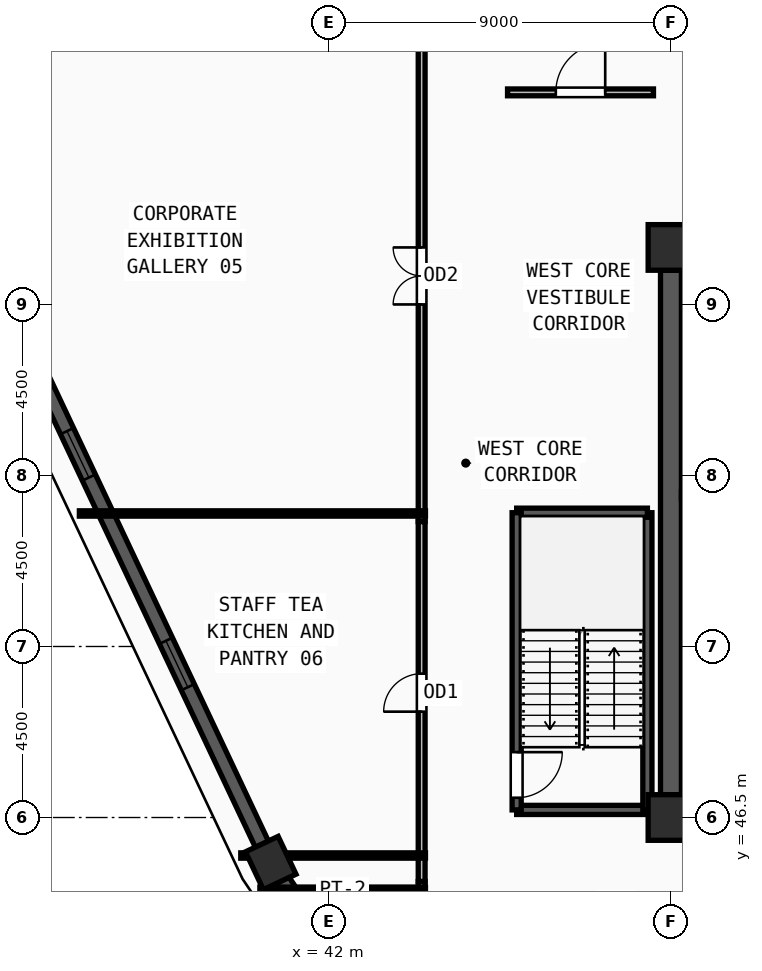
"""IFC4 building model, lengths in metres.
Left out: names, types, materials, properties, quantities, classifications, styles, units other than length and angle.
Written with IfcOpenShell. Run it as: python <this file> out.ifc"""

import sys

from ifc_helpers import new_model, si_unit, direction, frame, frame_2d, origin, origin_2d, place, context, subcontext, project, spatial, rectangle, extrude, source, transform, mapped, element, fill, save


model = new_model("IFC4")
c1 = context("Model", 3, precision=1e-05, world=origin(), true_north=direction((0.0, 1.0)))
c2 = subcontext(c1, "Body", "Model", "MODEL_VIEW")
j1 = project(units=[si_unit("LENGTHUNIT", "METRE"), si_unit("PLANEANGLEUNIT", "RADIAN")], contexts=[c1])
p1 = place(None, origin())
s1 = spatial("IfcSite", under=j1, at=p1, CompositionType="ELEMENT")
p2 = place(p1, origin())
s2 = spatial("IfcBuilding", under=s1, at=p2, CompositionType="ELEMENT")
p3 = place(p2, frame((0.0, 0.0, 339.75)))
s3 = spatial("IfcBuildingStorey", under=s2, at=p3, CompositionType="ELEMENT", Elevation=339.75)
m1 = source(origin(), c2, "Body", "SweptSolid", [
    extrude(rectangle(XDim=1.2, YDim=1.2, at=origin_2d()), origin(), (0.0, 0.0, 1.0), 3.75),
])
for number, where, z_axis, x_axis in (
    (1, (51.0, 46.5, 0.0), (0.0, 0.0, 1.0), (1.0, 0.0, 0.0)),
    (2, (51.0, 61.5, 0.0), (0.0, 0.0, 1.0), (1.0, 0.0, 0.0)),
):
    element("IfcColumn", number, at=place(p3, frame(where, z_axis=z_axis, x_axis=x_axis)), inside=s3, PredefinedType="COLUMN", context=c2, shape_type="MappedRepresentation", body=[
        mapped(m1, transform((0.0, 0.0, 0.0), x_axis=(1.0, 0.0, 0.0), y_axis=(0.0, 1.0, 0.0), z_axis=(0.0, 0.0, 1.0), scale=1.0)),
    ])
m2 = source(origin(), c2, "Body", "SweptSolid", [
    extrude(rectangle(XDim=1.1, YDim=0.95, at=origin_2d()), origin(), (0.0, 0.0, 1.0), 3.75),
])
p4 = place(p3, frame((40.469, 45.303, 0.0), z_axis=(0.0, 0.0, 1.0), x_axis=(-0.426726590606, 0.904380681389, 0.0)))
e3 = element("IfcColumn", 3, at=p4, inside=s3, PredefinedType="COLUMN", context=c2, shape_type="MappedRepresentation", body=[
    mapped(m2, transform((0.0, 0.0, 0.0), x_axis=(1.0, 0.0, 0.0), y_axis=(0.0, 1.0, 0.0), z_axis=(0.0, 0.0, 1.0), scale=1.0)),
])
p5 = place(p3, frame((31.278, 64.782, 0.0), z_axis=(0.0, 0.0, 1.0), x_axis=(0.426732975356, -0.904377668756, 0.0)))
e4 = element("IfcWall", 4, at=p5, inside=s3, PredefinedType="SOLIDWALL", context=c2, shape_type="SweptSolid", body=[
    extrude(rectangle(XDim=20.999, YDim=0.38, at=frame_2d((10.5, 0.0))), origin(), (0.0, 0.0, 1.0), 3.57),
])
m3 = source(origin(), c2, "Body", "SweptSolid", [
    extrude(rectangle(XDim=1.35, YDim=1.85, at=frame_2d((0.675, 0.925))), frame((0.0, 0.2, 0.0), z_axis=(0.0, -1.0, 0.0), x_axis=(1.0, 0.0, 0.0)), (0.0, 0.0, 1.0), 0.4),
])
p6 = place(p5, frame((4.575, 0.0, 0.55)))
e5 = element("IfcOpeningElement", 5, at=p6, cuts=e4, PredefinedType="OPENING", context=c2, shape_type="MappedRepresentation", body=[
    mapped(m3, transform((0.0, 0.0, 0.0), x_axis=(1.0, 0.0, 0.0), y_axis=(0.0, 1.0, 0.0), z_axis=(0.0, 0.0, 1.0), scale=1.0)),
])
p7 = place(p5, frame((8.974, 0.0, 0.55)))
e6 = element("IfcOpeningElement", 6, at=p7, cuts=e4, PredefinedType="OPENING", context=c2, shape_type="MappedRepresentation", body=[
    mapped(m3, transform((0.0, 0.0, 0.0), x_axis=(1.0, 0.0, 0.0), y_axis=(0.0, 1.0, 0.0), z_axis=(0.0, 0.0, 1.0), scale=1.0)),
])
p8 = place(p5, frame((15.074, 0.0, 0.55)))
e7 = element("IfcOpeningElement", 7, at=p8, cuts=e4, PredefinedType="OPENING", context=c2, shape_type="MappedRepresentation", body=[
    mapped(m3, transform((0.0, 0.0, 0.0), x_axis=(1.0, 0.0, 0.0), y_axis=(0.0, 1.0, 0.0), z_axis=(0.0, 0.0, 1.0), scale=1.0)),
])
p9 = place(p3, frame((40.771, 44.855, 0.0), z_axis=(0.0, 0.0, 1.0), x_axis=(0.558627041585, -0.82941897037, 0.0)))
e8 = element("IfcWall", 8, at=p9, inside=s3, PredefinedType="SOLIDWALL", context=c2, shape_type="SweptSolid", body=[
    extrude(rectangle(XDim=25.455, YDim=0.38, at=frame_2d((12.728, 0.0))), origin(), (0.0, 0.0, 1.0), 3.57),
])
p10 = place(p9, frame((5.689, 0.0, 0.55)))
e9 = element("IfcOpeningElement", 9, at=p10, cuts=e8, PredefinedType="OPENING", context=c2, shape_type="MappedRepresentation", body=[
    mapped(m3, transform((0.0, 0.0, 0.0), x_axis=(1.0, 0.0, 0.0), y_axis=(0.0, 1.0, 0.0), z_axis=(0.0, 0.0, 1.0), scale=1.0)),
])
p11 = place(p9, frame((12.053, 0.0, 0.55)))
e10 = element("IfcOpeningElement", 10, at=p11, cuts=e8, PredefinedType="OPENING", context=c2, shape_type="MappedRepresentation", body=[
    mapped(m3, transform((0.0, 0.0, 0.0), x_axis=(1.0, 0.0, 0.0), y_axis=(0.0, 1.0, 0.0), z_axis=(0.0, 0.0, 1.0), scale=1.0)),
])
p12 = place(p9, frame((18.416, 0.0, 0.55)))
e11 = element("IfcOpeningElement", 11, at=p12, cuts=e8, PredefinedType="OPENING", context=c2, shape_type="MappedRepresentation", body=[
    mapped(m3, transform((0.0, 0.0, 0.0), x_axis=(1.0, 0.0, 0.0), y_axis=(0.0, 1.0, 0.0), z_axis=(0.0, 0.0, 1.0), scale=1.0)),
])
p13 = place(p3, frame((51.0, 47.1, 0.0), z_axis=(0.0, 0.0, 1.0), x_axis=(0.0, 1.0, 0.0)))
e12 = element("IfcWall", 12, at=p13, inside=s3, PredefinedType="SHEAR", context=c2, shape_type="SweptSolid", body=[
    extrude(rectangle(XDim=13.8, YDim=0.55, at=frame_2d((6.9, 0.0))), origin(), (0.0, 0.0, 1.0), 3.57),
])
p14 = place(p3, frame((46.94, 46.7, 0.0), z_axis=(0.0, 0.0, 1.0), x_axis=(1.0, 0.0, 0.0)))
e13 = element("IfcWall", 13, at=p14, inside=s3, PredefinedType="SOLIDWALL", context=c2, shape_type="SweptSolid", body=[
    extrude(rectangle(XDim=3.44, YDim=0.24, at=frame_2d((1.72, 0.0))), origin(), (0.0, 0.0, 1.0), 3.57),
])
p15 = place(p3, frame((50.38, 46.7, 0.0), z_axis=(0.0, 0.0, 1.0), x_axis=(0.0, 1.0, 0.0)))
e14 = element("IfcWall", 14, at=p15, inside=s3, PredefinedType="SOLIDWALL", context=c2, shape_type="SweptSolid", body=[
    extrude(rectangle(XDim=7.82, YDim=0.24, at=frame_2d((3.91, 0.0))), origin(), (0.0, 0.0, 1.0), 3.57),
])
p16 = place(p3, frame((50.38, 54.52, 0.0), z_axis=(0.0, 0.0, 1.0), x_axis=(-1.0, 0.0, 0.0)))
e15 = element("IfcWall", 15, at=p16, inside=s3, PredefinedType="SOLIDWALL", context=c2, shape_type="SweptSolid", body=[
    extrude(rectangle(XDim=3.44, YDim=0.24, at=frame_2d((1.72, 0.0))), origin(), (0.0, 0.0, 1.0), 3.57),
])
p17 = place(p3, frame((46.94, 54.52, 0.0), z_axis=(0.0, 0.0, 1.0), x_axis=(0.0, -1.0, 0.0)))
e16 = element("IfcWall", 16, at=p17, inside=s3, PredefinedType="SOLIDWALL", context=c2, shape_type="SweptSolid", body=[
    extrude(rectangle(XDim=7.82, YDim=0.24, at=frame_2d((3.91, 0.0))), origin(), (0.0, 0.0, 1.0), 3.57),
])
m4 = source(origin(), c2, "Body", "SweptSolid", [
    extrude(rectangle(XDim=1.2, YDim=2.2, at=frame_2d((0.6, 1.1))), frame((0.0, 0.13, 0.0), z_axis=(0.0, -1.0, 0.0), x_axis=(1.0, 0.0, 0.0)), (0.0, 0.0, 1.0), 0.26),
])
p18 = place(p17, frame((6.3, 0.0, 0.0)))
e17 = element("IfcOpeningElement", 17, at=p18, cuts=e16, PredefinedType="OPENING", context=c2, shape_type="MappedRepresentation", body=[
    mapped(m4, transform((0.0, 0.0, 0.0), x_axis=(1.0, 0.0, 0.0), y_axis=(0.0, 1.0, 0.0), z_axis=(0.0, 0.0, 1.0), scale=1.0)),
])
p19 = place(p3, frame((51.275, 54.98, 0.0), z_axis=(0.0, 0.0, 1.0), x_axis=(1.0, 0.0, 0.0)))
e18 = element("IfcWall", 18, at=p19, inside=s3, PredefinedType="PARTITIONING", context=c2, shape_type="SweptSolid", body=[
    extrude(rectangle(XDim=2.485, YDim=0.18, at=frame_2d((1.243, 0.0))), origin(), (0.0, 0.0, 1.0), 3.57),
])
m5 = source(origin(), c2, "Body", "SweptSolid", [
    extrude(rectangle(XDim=0.85, YDim=2.1, at=frame_2d((0.425, 1.05))), frame((0.0, 0.1, 0.0), z_axis=(0.0, -1.0, 0.0), x_axis=(1.0, 0.0, 0.0)), (0.0, 0.0, 1.0), 0.2),
])
p20 = place(p19, frame((0.915, 0.0, 0.0)))
e19 = element("IfcOpeningElement", 19, at=p20, cuts=e18, PredefinedType="OPENING", context=c2, shape_type="MappedRepresentation", body=[
    mapped(m5, transform((0.0, 0.0, 0.0), x_axis=(1.0, 0.0, 0.0), y_axis=(0.0, 1.0, 0.0), z_axis=(0.0, 0.0, 1.0), scale=1.0)),
])
p21 = place(p3, frame((46.7, 65.58, 0.0), z_axis=(0.0, 0.0, 1.0), x_axis=(1.0, 0.0, 0.0)))
e20 = element("IfcWall", 20, at=p21, inside=s3, PredefinedType="PARTITIONING", context=c2, shape_type="SweptSolid", body=[
    extrude(rectangle(XDim=3.84, YDim=0.18, at=frame_2d((1.92, 0.0))), origin(), (0.0, 0.0, 1.0), 3.57),
])
m6 = source(origin(), c2, "Body", "SweptSolid", [
    extrude(rectangle(XDim=1.3, YDim=2.2, at=frame_2d((0.65, 1.1))), frame((0.0, 0.1, 0.0), z_axis=(0.0, -1.0, 0.0), x_axis=(1.0, 0.0, 0.0)), (0.0, 0.0, 1.0), 0.2),
])
p22 = place(p21, frame((1.27, 0.0, 0.0)))
e21 = element("IfcOpeningElement", 21, at=p22, cuts=e20, PredefinedType="OPENING", context=c2, shape_type="MappedRepresentation", body=[
    mapped(m6, transform((0.0, 0.0, 0.0), x_axis=(1.0, 0.0, 0.0), y_axis=(0.0, 1.0, 0.0), z_axis=(0.0, 0.0, 1.0), scale=1.0)),
])
p23 = place(p3, frame((44.44, 54.285, 0.0), z_axis=(0.0, 0.0, 1.0), x_axis=(0.0, 1.0, 0.0)))
e22 = element("IfcWall", 22, at=p23, inside=s3, PredefinedType="PARTITIONING", context=c2, shape_type="SweptSolid", body=[
    extrude(rectangle(XDim=12.93, YDim=0.18, at=frame_2d((6.465, 0.0))), origin(), (0.0, 0.0, 1.0), 3.261),
])
m7 = source(origin(), c2, "Body", "SweptSolid", [
    extrude(rectangle(XDim=1.5, YDim=2.2, at=frame_2d((0.75, 1.1))), frame((0.0, 0.1, 0.0), z_axis=(0.0, -1.0, 0.0), x_axis=(1.0, 0.0, 0.0)), (0.0, 0.0, 1.0), 0.2),
])
p24 = place(p23, frame((5.715, 0.0, 0.0)))
e23 = element("IfcOpeningElement", 23, at=p24, cuts=e22, PredefinedType="OPENING", context=c2, shape_type="MappedRepresentation", body=[
    mapped(m7, transform((0.0, 0.0, 0.0), x_axis=(1.0, 0.0, 0.0), y_axis=(0.0, 1.0, 0.0), z_axis=(0.0, 0.0, 1.0), scale=1.0)),
])
p25 = place(p3, frame((44.44, 44.815, 0.0), z_axis=(0.0, 0.0, 1.0), x_axis=(0.0, 1.0, 0.0)))
e24 = element("IfcWall", 24, at=p25, inside=s3, PredefinedType="PARTITIONING", context=c2, shape_type="SweptSolid", body=[
    extrude(rectangle(XDim=9.47, YDim=0.18, at=frame_2d((4.735, 0.0))), origin(), (0.0, 0.0, 1.0), 3.57),
])
m8 = source(origin(), c2, "Body", "SweptSolid", [
    extrude(rectangle(XDim=1.0, YDim=2.2, at=frame_2d((0.5, 1.1))), frame((0.0, 0.1, 0.0), z_axis=(0.0, -1.0, 0.0), x_axis=(1.0, 0.0, 0.0)), (0.0, 0.0, 1.0), 0.2),
])
p26 = place(p25, frame((4.47, 0.0, 0.0)))
e25 = element("IfcOpeningElement", 25, at=p26, cuts=e24, PredefinedType="OPENING", context=c2, shape_type="MappedRepresentation", body=[
    mapped(m8, transform((0.0, 0.0, 0.0), x_axis=(1.0, 0.0, 0.0), y_axis=(0.0, 1.0, 0.0), z_axis=(0.0, 0.0, 1.0), scale=1.0)),
])
p27 = place(p3, frame((44.44, 43.67, 0.0), z_axis=(0.0, 0.0, 1.0), x_axis=(0.0, 1.0, 0.0)))
e26 = element("IfcWall", 26, at=p27, inside=s3, PredefinedType="PARTITIONING", context=c2, shape_type="SweptSolid", body=[
    extrude(rectangle(XDim=1.145, YDim=0.18, at=frame_2d((0.573, 0.0))), origin(), (0.0, 0.0, 1.0), 3.57),
])
p28 = place(p3, frame((44.54, 44.6, 0.0), z_axis=(0.0, 0.0, 1.0), x_axis=(-1.0, 0.0, 0.0)))
e27 = element("IfcWall", 27, at=p28, inside=s3, PredefinedType="PARTITIONING", context=c2, shape_type="SweptSolid", body=[
    extrude(rectangle(XDim=4.357, YDim=0.14, at=frame_2d((2.178, 0.0))), origin(), (0.0, 0.0, 1.0), 3.57),
])
p29 = place(p3, frame((44.54, 45.5, 0.0), z_axis=(0.0, 0.0, 1.0), x_axis=(-1.0, 0.0, 0.0)))
e28 = element("IfcWall", 28, at=p29, inside=s3, PredefinedType="PARTITIONING", context=c2, shape_type="SweptSolid", body=[
    extrude(rectangle(XDim=4.86, YDim=0.14, at=frame_2d((2.43, 0.0))), origin(), (0.0, 0.0, 1.0), 3.57),
])
p30 = place(p3, frame((44.54, 54.5, 0.0), z_axis=(0.0, 0.0, 1.0), x_axis=(-1.0, 0.0, 0.0)))
e29 = element("IfcWall", 29, at=p30, inside=s3, PredefinedType="PARTITIONING", context=c2, shape_type="SweptSolid", body=[
    extrude(rectangle(XDim=9.107, YDim=0.14, at=frame_2d((4.553, 0.0))), origin(), (0.0, 0.0, 1.0), 3.57),
])
m9 = source(origin(), c2, "Body", "SweptSolid", [
    extrude(rectangle(XDim=1.35, YDim=1.85, at=frame_2d((0.675, 0.925))), frame((0.0, 0.03, 0.0), z_axis=(0.0, -1.0, 0.0), x_axis=(1.0, 0.0, 0.0)), (0.0, 0.0, 1.0), 0.06),
])
p31 = place(p7, origin())
e30 = element("IfcWindow", 30, at=p31, inside=s3, PartitioningType="SINGLE_PANEL", PredefinedType="WINDOW", context=c2, shape_type="MappedRepresentation", body=[
    mapped(m9, transform((0.0, 0.0, 0.0), x_axis=(1.0, 0.0, 0.0), y_axis=(0.0, 1.0, 0.0), z_axis=(0.0, 0.0, 1.0), scale=1.0)),
])
fill(e6, e30)
p32 = place(p8, origin())
e31 = element("IfcWindow", 31, at=p32, inside=s3, PartitioningType="SINGLE_PANEL", PredefinedType="WINDOW", context=c2, shape_type="MappedRepresentation", body=[
    mapped(m9, transform((0.0, 0.0, 0.0), x_axis=(1.0, 0.0, 0.0), y_axis=(0.0, 1.0, 0.0), z_axis=(0.0, 0.0, 1.0), scale=1.0)),
])
fill(e7, e31)
m10 = source(origin(), c2, "Body", "SweptSolid", [
    extrude(rectangle(XDim=1.2, YDim=2.2, at=frame_2d((0.6, 1.1))), frame((0.0, 0.025, 0.0), z_axis=(0.0, -1.0, 0.0), x_axis=(1.0, 0.0, 0.0)), (0.0, 0.0, 1.0), 0.05),
])
p33 = place(p18, origin())
e32 = element("IfcDoor", 32, at=p33, inside=s3, OperationType="SINGLE_SWING_LEFT", PredefinedType="DOOR", context=c2, shape_type="MappedRepresentation", body=[
    mapped(m10, transform((0.0, 0.0, 0.0), x_axis=(1.0, 0.0, 0.0), y_axis=(0.0, 1.0, 0.0), z_axis=(0.0, 0.0, 1.0), scale=1.0)),
])
fill(e17, e32)
m11 = source(origin(), c2, "Body", "SweptSolid", [
    extrude(rectangle(XDim=1.3, YDim=2.2, at=frame_2d((0.65, 1.1))), frame((0.0, 0.025, 0.0), z_axis=(0.0, -1.0, 0.0), x_axis=(1.0, 0.0, 0.0)), (0.0, 0.0, 1.0), 0.05),
])
p34 = place(p22, origin())
e33 = element("IfcDoor", 33, at=p34, inside=s3, OperationType="SINGLE_SWING_RIGHT", PredefinedType="DOOR", context=c2, shape_type="MappedRepresentation", body=[
    mapped(m11, transform((0.0, 0.0, 0.0), x_axis=(1.0, 0.0, 0.0), y_axis=(0.0, 1.0, 0.0), z_axis=(0.0, 0.0, 1.0), scale=1.0)),
])
fill(e21, e33)
m12 = source(origin(), c2, "Body", "SweptSolid", [
    extrude(rectangle(XDim=1.5, YDim=2.2, at=frame_2d((0.75, 1.1))), frame((0.0, 0.025, 0.0), z_axis=(0.0, -1.0, 0.0), x_axis=(1.0, 0.0, 0.0)), (0.0, 0.0, 1.0), 0.05),
])
p35 = place(p24, origin())
e34 = element("IfcDoor", 34, at=p35, inside=s3, OperationType="DOUBLE_DOOR_SINGLE_SWING", PredefinedType="DOOR", context=c2, shape_type="MappedRepresentation", body=[
    mapped(m12, transform((0.0, 0.0, 0.0), x_axis=(1.0, 0.0, 0.0), y_axis=(0.0, 1.0, 0.0), z_axis=(0.0, 0.0, 1.0), scale=1.0)),
])
fill(e23, e34)
m13 = source(origin(), c2, "Body", "SweptSolid", [
    extrude(rectangle(XDim=1.0, YDim=2.2, at=frame_2d((0.5, 1.1))), frame((0.0, 0.025, 0.0), z_axis=(0.0, -1.0, 0.0), x_axis=(1.0, 0.0, 0.0)), (0.0, 0.0, 1.0), 0.05),
])
p36 = place(p26, origin())
e35 = element("IfcDoor", 35, at=p36, inside=s3, OperationType="SINGLE_SWING_LEFT", PredefinedType="DOOR", context=c2, shape_type="MappedRepresentation", body=[
    mapped(m13, transform((0.0, 0.0, 0.0), x_axis=(1.0, 0.0, 0.0), y_axis=(0.0, 1.0, 0.0), z_axis=(0.0, 0.0, 1.0), scale=1.0)),
])
fill(e25, e35)
save(model, sys.argv[1])
